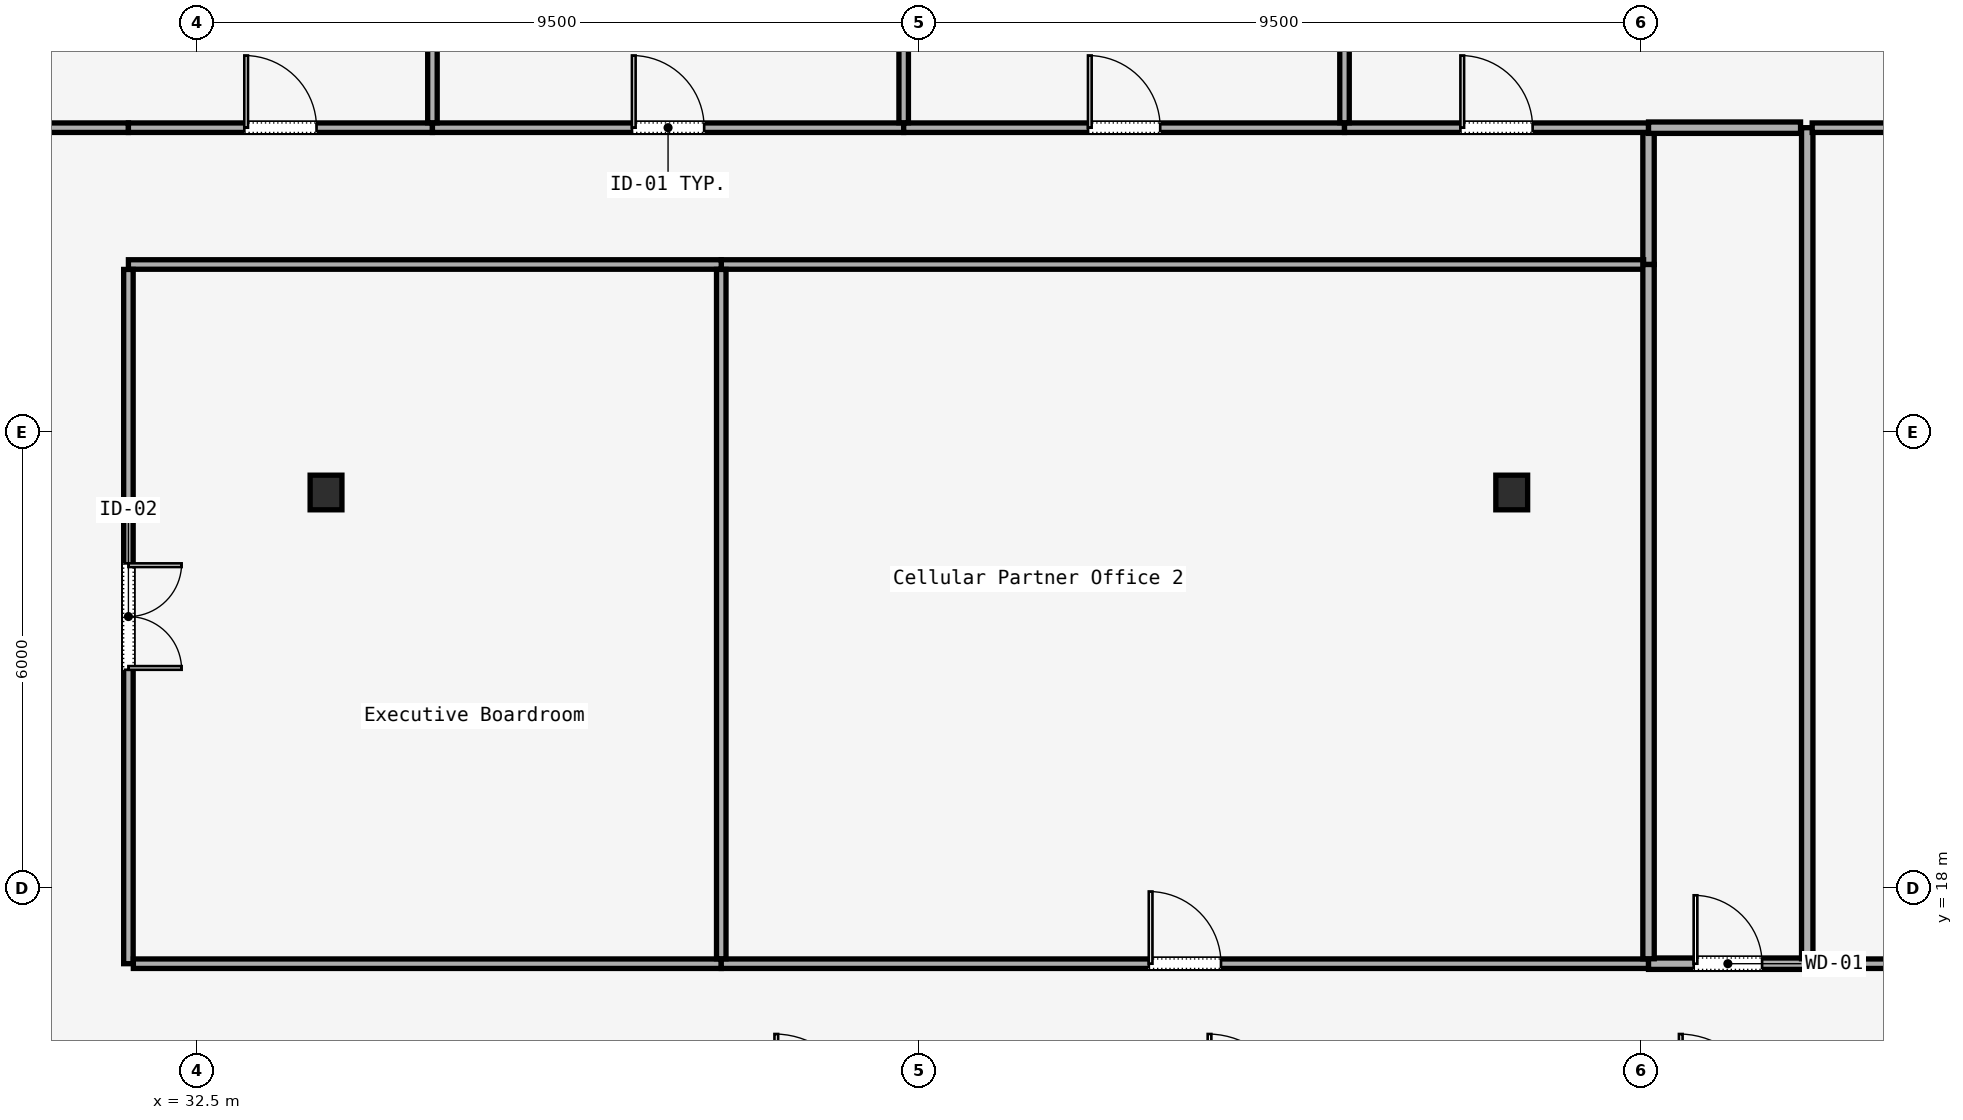
"""IFC4 building model, lengths in metres.
Left out: names, types, materials, properties, quantities, classifications, styles, units other than length and angle.
Written with IfcOpenShell. Run it as: python <this file> out.ifc"""

import sys

from ifc_helpers import new_model, si_unit, direction, frame, frame_2d, origin, origin_2d, place, context, subcontext, project, spatial, rectangle, i_section, extrude, element, fill, save


model = new_model("IFC4")
c1 = context("Model", 3, precision=1e-05, world=origin(), true_north=direction((0.0, 1.0)))
c2 = subcontext(c1, "Body", "Model", "MODEL_VIEW")
j1 = project(units=[si_unit("LENGTHUNIT", "METRE"), si_unit("PLANEANGLEUNIT", "RADIAN")], contexts=[c1])
p1 = place(None, origin())
s1 = spatial("IfcSite", under=j1, at=p1, CompositionType="ELEMENT")
p2 = place(p1, origin())
s2 = spatial("IfcBuilding", under=s1, at=p2, CompositionType="ELEMENT")
p3 = place(p2, frame((0.0, 0.0, 77.8)))
s3 = spatial("IfcBuildingStorey", under=s2, at=p3, CompositionType="ELEMENT", Elevation=77.8)
for number, where, z_axis, x_axis in (
    (1, (34.2, 23.2, 0.0), (0.0, 0.0, 1.0), (1.0, 0.0, 0.0)),
    (2, (49.8, 23.2, 0.0), (0.0, 0.0, 1.0), (1.0, 0.0, 0.0)),
):
    element("IfcColumn", number, at=place(p3, frame(where, z_axis=z_axis, x_axis=x_axis)), inside=s3, PredefinedType="COLUMN", context=c2, shape_type="SweptSolid", body=[
        extrude(i_section(OverallWidth=0.418, OverallDepth=0.456, WebThickness=0.042, FlangeThickness=0.067, FilletRadius=0.015, at=origin_2d()), origin(), (0.0, 0.0, 1.0), 3.58),
    ])
p4 = place(p3, frame((29.865, 28.0, 0.0), z_axis=(0.0, 0.0, 1.0), x_axis=(1.0, 0.0, 0.0)))
e3 = element("IfcWall", 3, at=p4, inside=s3, PredefinedType="PARTITIONING", context=c2, shape_type="SweptSolid", body=[
    extrude(rectangle(XDim=1.735, YDim=0.125, at=frame_2d((0.868, 0.0))), origin(), (0.0, 0.0, 1.0), 2.95),
])
p5 = place(p3, frame((31.6, 28.0, 0.0), z_axis=(0.0, 0.0, 1.0), x_axis=(1.0, 0.0, 0.0)))
e4 = element("IfcWall", 4, at=p5, inside=s3, PredefinedType="PARTITIONING", context=c2, shape_type="SweptSolid", body=[
    extrude(rectangle(XDim=4.0, YDim=0.125, at=frame_2d((2.0, 0.0))), origin(), (0.0, 0.0, 1.0), 2.95),
])
p6 = place(p5, frame((1.525, 0.0, 0.0)))
e5 = element("IfcOpeningElement", 5, at=p6, cuts=e4, PredefinedType="OPENING", context=c2, shape_type="SweptSolid", body=[
    extrude(rectangle(XDim=0.95, YDim=2.2, at=frame_2d((0.475, 1.1))), frame((0.0, 0.062, 0.0), z_axis=(0.0, -1.0, 0.0), x_axis=(1.0, 0.0, 0.0)), (0.0, 0.0, 1.0), 0.125),
])
p7 = place(p3, frame((35.6, 28.0, 0.0), z_axis=(0.0, 0.0, 1.0), x_axis=(1.0, 0.0, 0.0)))
e6 = element("IfcWall", 6, at=p7, inside=s3, PredefinedType="PARTITIONING", context=c2, shape_type="SweptSolid", body=[
    extrude(rectangle(XDim=6.2, YDim=0.125, at=frame_2d((3.1, 0.0))), origin(), (0.0, 0.0, 1.0), 2.95),
])
p8 = place(p7, frame((2.625, 0.0, 0.0)))
e7 = element("IfcOpeningElement", 7, at=p8, cuts=e6, PredefinedType="OPENING", context=c2, shape_type="SweptSolid", body=[
    extrude(rectangle(XDim=0.95, YDim=2.2, at=frame_2d((0.475, 1.1))), frame((0.0, 0.062, 0.0), z_axis=(0.0, -1.0, 0.0), x_axis=(1.0, 0.0, 0.0)), (0.0, 0.0, 1.0), 0.125),
])
p9 = place(p3, frame((41.8, 28.0, 0.0), z_axis=(0.0, 0.0, 1.0), x_axis=(1.0, 0.0, 0.0)))
e8 = element("IfcWall", 8, at=p9, inside=s3, PredefinedType="PARTITIONING", context=c2, shape_type="SweptSolid", body=[
    extrude(rectangle(XDim=5.8, YDim=0.125, at=frame_2d((2.9, 0.0))), origin(), (0.0, 0.0, 1.0), 2.95),
])
p10 = place(p9, frame((2.425, 0.0, 0.0)))
e9 = element("IfcOpeningElement", 9, at=p10, cuts=e8, PredefinedType="OPENING", context=c2, shape_type="SweptSolid", body=[
    extrude(rectangle(XDim=0.95, YDim=2.2, at=frame_2d((0.475, 1.1))), frame((0.0, 0.062, 0.0), z_axis=(0.0, -1.0, 0.0), x_axis=(1.0, 0.0, 0.0)), (0.0, 0.0, 1.0), 0.125),
])
p11 = place(p3, frame((47.6, 28.0, 0.0), z_axis=(0.0, 0.0, 1.0), x_axis=(1.0, 0.0, 0.0)))
e10 = element("IfcWall", 10, at=p11, inside=s3, PredefinedType="PARTITIONING", context=c2, shape_type="SweptSolid", body=[
    extrude(rectangle(XDim=4.0, YDim=0.125, at=frame_2d((2.0, 0.0))), origin(), (0.0, 0.0, 1.0), 2.95),
])
p12 = place(p11, frame((1.525, 0.0, 0.0)))
e11 = element("IfcOpeningElement", 11, at=p12, cuts=e10, PredefinedType="OPENING", context=c2, shape_type="SweptSolid", body=[
    extrude(rectangle(XDim=0.95, YDim=2.2, at=frame_2d((0.475, 1.1))), frame((0.0, 0.062, 0.0), z_axis=(0.0, -1.0, 0.0), x_axis=(1.0, 0.0, 0.0)), (0.0, 0.0, 1.0), 0.125),
])
p13 = place(p3, frame((51.6, 27.935, 0.0), z_axis=(0.0, 0.0, 1.0), x_axis=(0.0, -1.0, 0.0)))
e12 = element("IfcWall", 12, at=p13, inside=s3, PredefinedType="PARTITIONING", context=c2, shape_type="SweptSolid", body=[
    extrude(rectangle(XDim=1.735, YDim=0.15, at=frame_2d((0.868, 0.0))), origin(), (0.0, 0.0, 1.0), 2.95),
])
p14 = place(p3, frame((51.535, 26.2, 0.0), z_axis=(0.0, 0.0, 1.0), x_axis=(-1.0, 0.0, 0.0)))
e13 = element("IfcWall", 13, at=p14, inside=s3, PredefinedType="PARTITIONING", context=c2, shape_type="SweptSolid", body=[
    extrude(rectangle(XDim=12.135, YDim=0.125, at=frame_2d((6.067, 0.0))), origin(), (0.0, 0.0, 1.0), 2.95),
])
p15 = place(p3, frame((39.4, 26.2, 0.0), z_axis=(0.0, 0.0, 1.0), x_axis=(-1.0, 0.0, 0.0)))
e14 = element("IfcWall", 14, at=p15, inside=s3, PredefinedType="PARTITIONING", context=c2, shape_type="SweptSolid", body=[
    extrude(rectangle(XDim=7.8, YDim=0.125, at=frame_2d((3.9, 0.0))), origin(), (0.0, 0.0, 1.0), 2.95),
])
p16 = place(p3, frame((31.6, 26.135, 0.0), z_axis=(0.0, 0.0, 1.0), x_axis=(0.0, -1.0, 0.0)))
e15 = element("IfcWall", 15, at=p16, inside=s3, PredefinedType="PARTITIONING", context=c2, shape_type="SweptSolid", body=[
    extrude(rectangle(XDim=9.135, YDim=0.125, at=frame_2d((4.567, 0.0))), origin(), (0.0, 0.0, 1.0), 2.95),
])
p17 = place(p16, frame((3.867, 0.0, 0.0)))
e16 = element("IfcOpeningElement", 16, at=p17, cuts=e15, PredefinedType="OPENING", context=c2, shape_type="SweptSolid", body=[
    extrude(rectangle(XDim=1.4, YDim=2.2, at=frame_2d((0.7, 1.1))), frame((0.0, 0.062, 0.0), z_axis=(0.0, -1.0, 0.0), x_axis=(1.0, 0.0, 0.0)), (0.0, 0.0, 1.0), 0.125),
])
p18 = place(p3, frame((31.665, 17.0, 0.0), z_axis=(0.0, 0.0, 1.0), x_axis=(1.0, 0.0, 0.0)))
e17 = element("IfcWall", 17, at=p18, inside=s3, PredefinedType="PARTITIONING", context=c2, shape_type="SweptSolid", body=[
    extrude(rectangle(XDim=7.735, YDim=0.125, at=frame_2d((3.867, 0.0))), origin(), (0.0, 0.0, 1.0), 2.95),
])
p19 = place(p3, frame((39.4, 17.0, 0.0), z_axis=(0.0, 0.0, 1.0), x_axis=(1.0, 0.0, 0.0)))
e18 = element("IfcWall", 18, at=p19, inside=s3, PredefinedType="PARTITIONING", context=c2, shape_type="SweptSolid", body=[
    extrude(rectangle(XDim=12.2, YDim=0.125, at=frame_2d((6.1, 0.0))), origin(), (0.0, 0.0, 1.0), 2.95),
])
p20 = place(p19, frame((5.625, 0.0, 0.0)))
e19 = element("IfcOpeningElement", 19, at=p20, cuts=e18, PredefinedType="OPENING", context=c2, shape_type="SweptSolid", body=[
    extrude(rectangle(XDim=0.95, YDim=2.2, at=frame_2d((0.475, 1.1))), frame((0.0, 0.062, 0.0), z_axis=(0.0, -1.0, 0.0), x_axis=(1.0, 0.0, 0.0)), (0.0, 0.0, 1.0), 0.125),
])
p21 = place(p3, frame((51.6, 17.0, 0.0), z_axis=(0.0, 0.0, 1.0), x_axis=(1.0, 0.0, 0.0)))
e20 = element("IfcWall", 20, at=p21, inside=s3, PredefinedType="PARTITIONING", context=c2, shape_type="SweptSolid", body=[
    extrude(rectangle(XDim=2.088, YDim=0.15, at=frame_2d((1.044, 0.0))), origin(), (0.0, 0.0, 1.0), 2.95),
])
p22 = place(p21, frame((0.594, 0.0, 0.0)))
e21 = element("IfcOpeningElement", 21, at=p22, cuts=e20, PredefinedType="OPENING", context=c2, shape_type="SweptSolid", body=[
    extrude(rectangle(XDim=0.9, YDim=2.15, at=frame_2d((0.45, 1.075))), frame((0.0, 0.075, 0.0), z_axis=(0.0, -1.0, 0.0), x_axis=(1.0, 0.0, 0.0)), (0.0, 0.0, 1.0), 0.15),
])
p23 = place(p3, frame((53.688, 17.0, 0.0), z_axis=(0.0, 0.0, 1.0), x_axis=(1.0, 0.0, 0.0)))
e22 = element("IfcWall", 22, at=p23, inside=s3, PredefinedType="PARTITIONING", context=c2, shape_type="SweptSolid", body=[
    extrude(rectangle(XDim=3.912, YDim=0.125, at=frame_2d((1.956, 0.0))), origin(), (0.0, 0.0, 1.0), 2.95),
])
p24 = place(p23, frame((1.481, 0.0, 0.0)))
e23 = element("IfcOpeningElement", 23, at=p24, cuts=e22, PredefinedType="OPENING", context=c2, shape_type="SweptSolid", body=[
    extrude(rectangle(XDim=0.95, YDim=2.2, at=frame_2d((0.475, 1.1))), frame((0.0, 0.062, 0.0), z_axis=(0.0, -1.0, 0.0), x_axis=(1.0, 0.0, 0.0)), (0.0, 0.0, 1.0), 0.125),
])
p25 = place(p3, frame((39.4, 26.135, 0.0), z_axis=(0.0, 0.0, 1.0), x_axis=(0.0, -1.0, 0.0)))
e24 = element("IfcWall", 24, at=p25, inside=s3, PredefinedType="PARTITIONING", context=c2, shape_type="SweptSolid", body=[
    extrude(rectangle(XDim=9.07, YDim=0.125, at=frame_2d((4.535, 0.0))), origin(), (0.0, 0.0, 1.0), 2.95),
])
p26 = place(p3, frame((51.6, 26.2, 0.0), z_axis=(0.0, 0.0, 1.0), x_axis=(0.0, -1.0, 0.0)))
e25 = element("IfcWall", 25, at=p26, inside=s3, PredefinedType="PARTITIONING", context=c2, shape_type="SweptSolid", body=[
    extrude(rectangle(XDim=9.135, YDim=0.15, at=frame_2d((4.567, 0.0))), origin(), (0.0, 0.0, 1.0), 2.95),
])
p27 = place(p3, frame((53.688, 17.065, 0.0), z_axis=(0.0, 0.0, 1.0), x_axis=(0.0, 1.0, 0.0)))
e26 = element("IfcWall", 26, at=p27, inside=s3, PredefinedType="PARTITIONING", context=c2, shape_type="SweptSolid", body=[
    extrude(rectangle(XDim=10.935, YDim=0.15, at=frame_2d((5.468, 0.0))), origin(), (0.0, 0.0, 1.0), 2.95),
])
p28 = place(p3, frame((53.753, 28.0, 0.0), z_axis=(0.0, 0.0, 1.0), x_axis=(1.0, 0.0, 0.0)))
e27 = element("IfcWall", 27, at=p28, inside=s3, PredefinedType="PARTITIONING", context=c2, shape_type="SweptSolid", body=[
    extrude(rectangle(XDim=3.847, YDim=0.125, at=frame_2d((1.924, 0.0))), origin(), (0.0, 0.0, 1.0), 2.95),
])
p29 = place(p3, frame((51.6, 28.0, 0.0), z_axis=(0.0, 0.0, 1.0), x_axis=(1.0, 0.0, 0.0)))
e28 = element("IfcWall", 28, at=p29, inside=s3, PredefinedType="PARTITIONING", context=c2, shape_type="SweptSolid", body=[
    extrude(rectangle(XDim=2.0, YDim=0.15, at=frame_2d((1.0, 0.0))), origin(), (0.0, 0.0, 1.0), 2.95),
])
for number, where, z_axis, x_axis in (
    (29, (35.6, 45.865, 0.0), (0.0, 0.0, 1.0), (0.0, -1.0, 0.0)),
    (30, (47.6, 28.065, 0.0), (0.0, 0.0, 1.0), (0.0, 1.0, 0.0)),
    (31, (41.8, 45.865, 0.0), (0.0, 0.0, 1.0), (0.0, -1.0, 0.0)),
):
    element("IfcWall", number, at=place(p3, frame(where, z_axis=z_axis, x_axis=x_axis)), inside=s3, PredefinedType="PARTITIONING", context=c2, shape_type="SweptSolid", body=[
        extrude(rectangle(XDim=17.801, YDim=0.125, at=frame_2d((8.9, 0.0))), origin(), (0.0, 0.0, 1.0), 2.95),
    ])
p30 = place(p17, origin())
e32 = element("IfcDoor", 32, at=p30, inside=s3, OperationType="SINGLE_SWING_LEFT", PredefinedType="DOOR", context=c2, shape_type="SweptSolid", body=[
    extrude(rectangle(XDim=1.4, YDim=2.2, at=frame_2d((0.7, 1.1))), frame((0.0, 0.025, 0.0), z_axis=(0.0, -1.0, 0.0), x_axis=(1.0, 0.0, 0.0)), (0.0, 0.0, 1.0), 0.05),
])
fill(e16, e32)
p31 = place(p20, origin())
e33 = element("IfcDoor", 33, at=p31, inside=s3, OperationType="SINGLE_SWING_RIGHT", PredefinedType="DOOR", context=c2, shape_type="SweptSolid", body=[
    extrude(rectangle(XDim=0.95, YDim=2.2, at=frame_2d((0.475, 1.1))), frame((0.0, 0.025, 0.0), z_axis=(0.0, -1.0, 0.0), x_axis=(1.0, 0.0, 0.0)), (0.0, 0.0, 1.0), 0.05),
])
fill(e19, e33)
p32 = place(p22, origin())
e34 = element("IfcDoor", 34, at=p32, inside=s3, OperationType="SINGLE_SWING_RIGHT", PredefinedType="DOOR", context=c2, shape_type="SweptSolid", body=[
    extrude(rectangle(XDim=0.9, YDim=2.15, at=frame_2d((0.45, 1.075))), frame((0.0, 0.025, 0.0), z_axis=(0.0, -1.0, 0.0), x_axis=(1.0, 0.0, 0.0)), (0.0, 0.0, 1.0), 0.05),
])
fill(e21, e34)
p33 = place(p6, origin())
e35 = element("IfcDoor", 35, at=p33, inside=s3, OperationType="SINGLE_SWING_RIGHT", PredefinedType="DOOR", context=c2, shape_type="SweptSolid", body=[
    extrude(rectangle(XDim=0.95, YDim=2.2, at=frame_2d((0.475, 1.1))), frame((0.0, 0.025, 0.0), z_axis=(0.0, -1.0, 0.0), x_axis=(1.0, 0.0, 0.0)), (0.0, 0.0, 1.0), 0.05),
])
fill(e5, e35)
p34 = place(p12, origin())
e36 = element("IfcDoor", 36, at=p34, inside=s3, OperationType="SINGLE_SWING_LEFT", PredefinedType="DOOR", context=c2, shape_type="SweptSolid", body=[
    extrude(rectangle(XDim=0.95, YDim=2.2, at=frame_2d((0.475, 1.1))), frame((0.0, 0.025, 0.0), z_axis=(0.0, -1.0, 0.0), x_axis=(1.0, 0.0, 0.0)), (0.0, 0.0, 1.0), 0.05),
])
fill(e11, e36)
p35 = place(p8, origin())
e37 = element("IfcDoor", 37, at=p35, inside=s3, OperationType="SINGLE_SWING_RIGHT", PredefinedType="DOOR", context=c2, shape_type="SweptSolid", body=[
    extrude(rectangle(XDim=0.95, YDim=2.2, at=frame_2d((0.475, 1.1))), frame((0.0, 0.025, 0.0), z_axis=(0.0, -1.0, 0.0), x_axis=(1.0, 0.0, 0.0)), (0.0, 0.0, 1.0), 0.05),
])
fill(e7, e37)
p36 = place(p10, origin())
e38 = element("IfcDoor", 38, at=p36, inside=s3, OperationType="SINGLE_SWING_LEFT", PredefinedType="DOOR", context=c2, shape_type="SweptSolid", body=[
    extrude(rectangle(XDim=0.95, YDim=2.2, at=frame_2d((0.475, 1.1))), frame((0.0, 0.025, 0.0), z_axis=(0.0, -1.0, 0.0), x_axis=(1.0, 0.0, 0.0)), (0.0, 0.0, 1.0), 0.05),
])
fill(e9, e38)
save(model, sys.argv[1])
